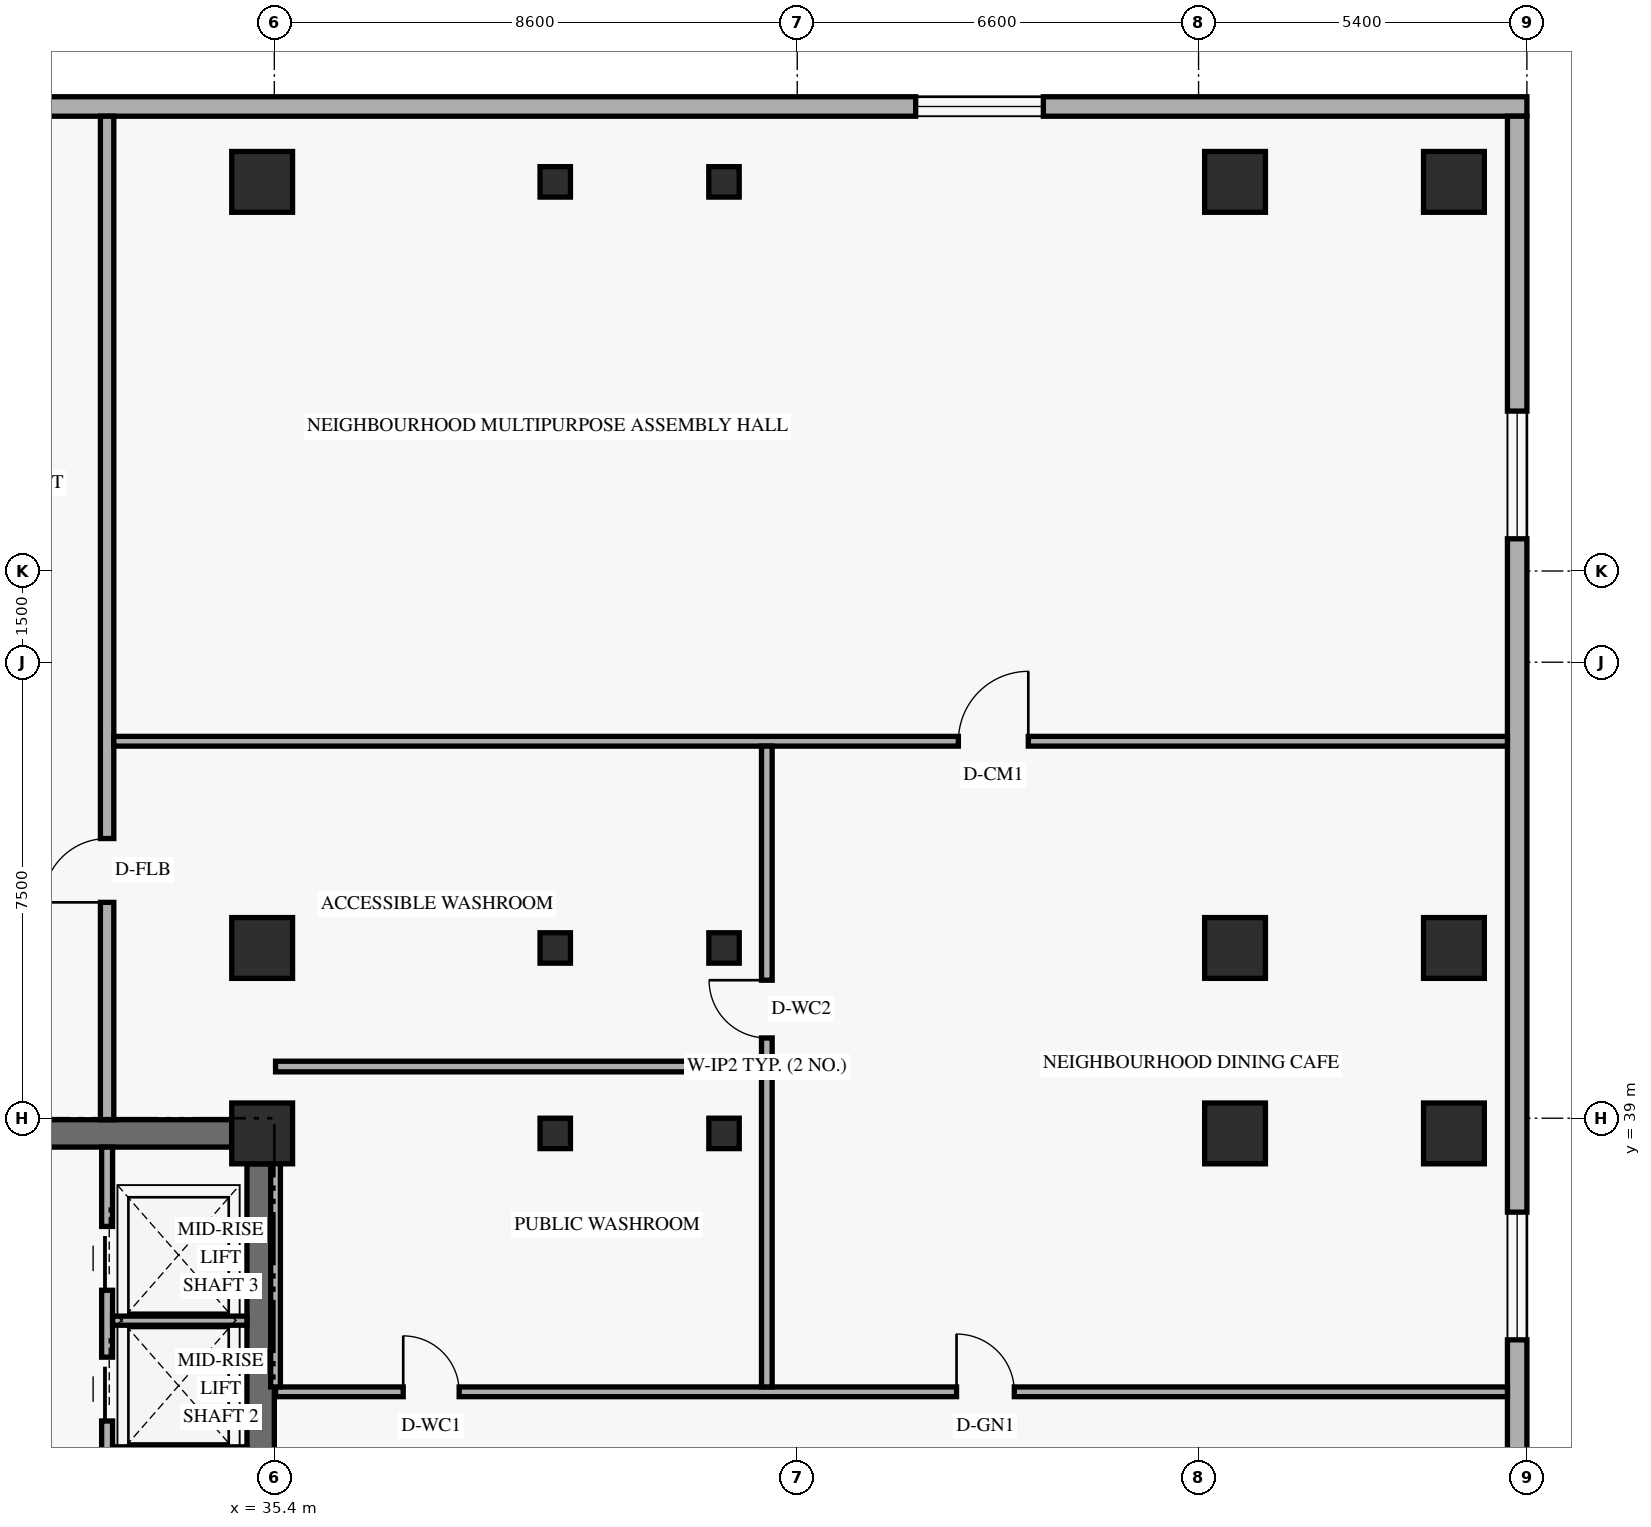
"""IFC4 building model, lengths in metres.
Left out: names, types, materials, properties, quantities, classifications, styles, units other than length and angle.
Written with IfcOpenShell. Run it as: python <this file> out.ifc"""

import sys

from ifc_helpers import new_model, si_unit, direction, frame, frame_2d, origin, origin_2d, place, context, subcontext, project, spatial, rectangle, hollow_rectangle, extrude, element, fill, save


model = new_model("IFC4")
c1 = context("Model", 3, precision=1e-05, world=origin(), true_north=direction((0.0, 1.0)))
c2 = subcontext(c1, "Body", "Model", "MODEL_VIEW")
j1 = project(units=[si_unit("LENGTHUNIT", "METRE"), si_unit("PLANEANGLEUNIT", "RADIAN")], contexts=[c1])
p1 = place(None, origin())
s1 = spatial("IfcSite", under=j1, at=p1, CompositionType="ELEMENT")
p2 = place(p1, origin())
s2 = spatial("IfcBuilding", under=s1, at=p2, CompositionType="ELEMENT")
p3 = place(p2, origin())
s3 = spatial("IfcBuildingStorey", under=s2, at=p3, CompositionType="ELEMENT", Elevation=0.0)
p4 = place(p3, frame((35.175, 31.35, 0.0), z_axis=(0.0, 0.0, 1.0), x_axis=(0.0, 1.0, 0.0)))
e1 = element("IfcWall", 1, at=p4, inside=s3, PredefinedType="SHEAR", context=c2, shape_type="SweptSolid", body=[
    extrude(rectangle(XDim=6.9, YDim=0.45, at=frame_2d((3.45, 0.0))), origin(), (0.0, 0.0, 1.0), 3.539),
])
p5 = place(p3, frame((24.7, 38.75, 0.0), z_axis=(0.0, 0.0, 1.0), x_axis=(1.0, 0.0, 0.0)))
e2 = element("IfcWall", 2, at=p5, inside=s3, PredefinedType="SHEAR", context=c2, shape_type="SweptSolid", body=[
    extrude(rectangle(XDim=10.0, YDim=0.45, at=frame_2d((5.0, 0.0))), origin(), (0.0, 0.0, 1.0), 4.39),
])
p6 = place(p5, frame((5.2, 0.0, 0.0)))
e3 = element("IfcOpeningElement", 3, at=p6, cuts=e2, PredefinedType="OPENING", context=c2, shape_type="SweptSolid", body=[
    extrude(rectangle(XDim=1.1, YDim=2.15, at=frame_2d((0.55, 1.075))), frame((0.0, 0.235, 0.0), z_axis=(0.0, -1.0, 0.0), x_axis=(1.0, 0.0, 0.0)), (0.0, 0.0, 1.0), 0.47),
])
for number, where, z_axis, x_axis in (
    (4, (35.2, 38.75, 0.0), (0.0, 0.0, 1.0), (1.0, 0.0, 0.0)),
    (5, (35.2, 41.8, 0.0), (0.0, 0.0, 1.0), (1.0, 0.0, 0.0)),
    (6, (35.2, 54.4, 0.0), (0.0, 0.0, 1.0), (1.0, 0.0, 0.0)),
):
    element("IfcColumn", number, at=place(p3, frame(where, z_axis=z_axis, x_axis=x_axis)), inside=s3, PredefinedType="COLUMN", context=c2, shape_type="SweptSolid", body=[
        extrude(rectangle(XDim=1.0, YDim=1.0, at=origin_2d()), origin(), (0.0, 0.0, 1.0), 4.8),
    ])
for number, where, z_axis, x_axis in (
    (7, (39.936, 38.75, 0.0), (0.035, 0.0, 0.999), (0.0, 1.0, 0.0)),
    (8, (39.936, 41.8, 0.0), (0.035, 0.0, 0.999), (0.0, 1.0, 0.0)),
    (9, (39.936, 54.4, 0.0), (0.035, 0.0, 0.999), (0.0, 1.0, 0.0)),
):
    element("IfcColumn", number, at=place(p3, frame(where, z_axis=z_axis, x_axis=x_axis)), inside=s3, PredefinedType="COLUMN", context=c2, shape_type="SweptSolid", body=[
        extrude(hollow_rectangle(XDim=0.5, YDim=0.5, WallThickness=0.022, at=origin_2d()), origin(), (0.0, 0.0, 1.0), 4.803),
    ])
for number, where, z_axis, x_axis in (
    (10, (42.657, 38.75, 0.0), (0.058, 0.0, 0.998), (0.0, 1.0, 0.0)),
    (11, (42.657, 41.8, 0.0), (0.058, 0.0, 0.998), (0.0, 1.0, 0.0)),
):
    element("IfcColumn", number, at=place(p3, frame(where, z_axis=z_axis, x_axis=x_axis)), inside=s3, PredefinedType="COLUMN", context=c2, shape_type="SweptSolid", body=[
        extrude(hollow_rectangle(XDim=0.5, YDim=0.5, WallThickness=0.022, at=origin_2d()), origin(), (0.0, 0.0, 1.0), 4.808),
    ])
p7 = place(p3, frame((42.657, 54.4, 0.0), z_axis=(0.057935044615, 0.0, 0.998320354699), x_axis=(0.0, 1.0, 0.0)))
e12 = element("IfcColumn", 12, at=p7, inside=s3, PredefinedType="COLUMN", context=c2, shape_type="SweptSolid", body=[
    extrude(hollow_rectangle(XDim=0.5, YDim=0.5, WallThickness=0.022, at=origin_2d()), origin(), (0.0, 0.0, 1.0), 4.783),
])
for number, where, z_axis, x_axis in (
    (13, (51.2, 38.75, 0.0), (0.0, 0.0, 1.0), (1.0, 0.0, 0.0)),
    (14, (51.2, 41.8, 0.0), (0.0, 0.0, 1.0), (1.0, 0.0, 0.0)),
    (15, (51.2, 54.4, 0.0), (0.0, 0.0, 1.0), (1.0, 0.0, 0.0)),
    (16, (54.8, 38.75, 0.0), (0.0, 0.0, 1.0), (1.0, 0.0, 0.0)),
    (17, (54.8, 41.8, 0.0), (0.0, 0.0, 1.0), (1.0, 0.0, 0.0)),
    (18, (54.8, 54.4, 0.0), (0.0, 0.0, 1.0), (1.0, 0.0, 0.0)),
):
    element("IfcColumn", number, at=place(p3, frame(where, z_axis=z_axis, x_axis=x_axis)), inside=s3, PredefinedType="COLUMN", context=c2, shape_type="SweptSolid", body=[
        extrude(rectangle(XDim=1.0, YDim=1.0, at=origin_2d()), origin(), (0.0, 0.0, 1.0), 4.8),
    ])
p8 = place(p3, frame((0.0, 55.64, 0.0), z_axis=(0.0, 0.0, 1.0), x_axis=(1.0, 0.0, 0.0)))
e19 = element("IfcWall", 19, at=p8, inside=s3, PredefinedType="SOLIDWALL", context=c2, shape_type="SweptSolid", body=[
    extrude(rectangle(XDim=56.0, YDim=0.32, at=frame_2d((28.0, 0.0))), origin(), (0.0, 0.0, 1.0), 4.39),
])
p9 = place(p8, frame((29.6, 0.0, 0.0)))
e20 = element("IfcOpeningElement", 20, at=p9, cuts=e19, PredefinedType="OPENING", context=c2, shape_type="SweptSolid", body=[
    extrude(rectangle(XDim=1.8, YDim=2.25, at=frame_2d((0.9, 1.125))), frame((0.0, 0.17, 0.0), z_axis=(0.0, -1.0, 0.0), x_axis=(1.0, 0.0, 0.0)), (0.0, 0.0, 1.0), 0.34),
])
p10 = place(p8, frame((15.2, 0.0, 0.0)))
e21 = element("IfcOpeningElement", 21, at=p10, cuts=e19, PredefinedType="OPENING", context=c2, shape_type="SweptSolid", body=[
    extrude(rectangle(XDim=2.0, YDim=2.35, at=frame_2d((1.0, 1.175))), frame((0.0, 0.17, 0.0), z_axis=(0.0, -1.0, 0.0), x_axis=(1.0, 0.0, 0.0)), (0.0, 0.0, 1.0), 0.34),
])
p11 = place(p8, frame((5.45, 0.0, 0.85)))
e22 = element("IfcOpeningElement", 22, at=p11, cuts=e19, PredefinedType="OPENING", context=c2, shape_type="SweptSolid", body=[
    extrude(rectangle(XDim=2.1, YDim=1.75, at=frame_2d((1.05, 0.875))), frame((0.0, 0.17, 0.0), z_axis=(0.0, -1.0, 0.0), x_axis=(1.0, 0.0, 0.0)), (0.0, 0.0, 1.0), 0.34),
])
p12 = place(p8, frame((20.175, 0.0, 0.85)))
e23 = element("IfcOpeningElement", 23, at=p12, cuts=e19, PredefinedType="OPENING", context=c2, shape_type="SweptSolid", body=[
    extrude(rectangle(XDim=2.1, YDim=1.75, at=frame_2d((1.05, 0.875))), frame((0.0, 0.17, 0.0), z_axis=(0.0, -1.0, 0.0), x_axis=(1.0, 0.0, 0.0)), (0.0, 0.0, 1.0), 0.34),
])
p13 = place(p8, frame((45.948, 0.0, 0.85)))
e24 = element("IfcOpeningElement", 24, at=p13, cuts=e19, PredefinedType="OPENING", context=c2, shape_type="SweptSolid", body=[
    extrude(rectangle(XDim=2.1, YDim=1.75, at=frame_2d((1.05, 0.875))), frame((0.0, 0.17, 0.0), z_axis=(0.0, -1.0, 0.0), x_axis=(1.0, 0.0, 0.0)), (0.0, 0.0, 1.0), 0.34),
])
p14 = place(p3, frame((55.84, 28.5, 0.0), z_axis=(0.0, 0.0, 1.0), x_axis=(0.0, 1.0, 0.0)))
e25 = element("IfcWall", 25, at=p14, inside=s3, PredefinedType="SOLIDWALL", context=c2, shape_type="SweptSolid", body=[
    extrude(rectangle(XDim=26.98, YDim=0.32, at=frame_2d((13.49, 0.0))), origin(), (0.0, 0.0, 1.0), 4.39),
])
p15 = place(p14, frame((2.2, 0.0, 0.0)))
e26 = element("IfcOpeningElement", 26, at=p15, cuts=e25, PredefinedType="OPENING", context=c2, shape_type="SweptSolid", body=[
    extrude(rectangle(XDim=2.0, YDim=2.35, at=frame_2d((1.0, 1.175))), frame((0.0, 0.17, 0.0), z_axis=(0.0, -1.0, 0.0), x_axis=(1.0, 0.0, 0.0)), (0.0, 0.0, 1.0), 0.34),
])
p16 = place(p14, frame((6.855, 0.0, 0.85)))
e27 = element("IfcOpeningElement", 27, at=p16, cuts=e25, PredefinedType="OPENING", context=c2, shape_type="SweptSolid", body=[
    extrude(rectangle(XDim=2.1, YDim=1.75, at=frame_2d((1.05, 0.875))), frame((0.0, 0.17, 0.0), z_axis=(0.0, -1.0, 0.0), x_axis=(1.0, 0.0, 0.0)), (0.0, 0.0, 1.0), 0.34),
])
p17 = place(p14, frame((20.03, 0.0, 0.85)))
e28 = element("IfcOpeningElement", 28, at=p17, cuts=e25, PredefinedType="OPENING", context=c2, shape_type="SweptSolid", body=[
    extrude(rectangle(XDim=2.1, YDim=1.75, at=frame_2d((1.05, 0.875))), frame((0.0, 0.17, 0.0), z_axis=(0.0, -1.0, 0.0), x_axis=(1.0, 0.0, 0.0)), (0.0, 0.0, 1.0), 0.34),
])
p18 = place(p3, frame((32.65, 31.35, 0.0), z_axis=(0.0, 0.0, 1.0), x_axis=(0.0, 1.0, 0.0)))
e29 = element("IfcWall", 29, at=p18, inside=s3, PredefinedType="STANDARD", context=c2, shape_type="SweptSolid", body=[
    extrude(rectangle(XDim=7.175, YDim=0.18, at=frame_2d((3.587, 0.0))), origin(), (0.0, 0.0, 1.0), 4.39),
])
p19 = place(p18, frame((0.52, 0.0, 0.0)))
e30 = element("IfcOpeningElement", 30, at=p19, cuts=e29, PredefinedType="OPENING", context=c2, shape_type="SweptSolid", body=[
    extrude(rectangle(XDim=1.05, YDim=2.2, at=frame_2d((0.525, 1.1))), frame((0.0, 0.1, 0.0), z_axis=(0.0, -1.0, 0.0), x_axis=(1.0, 0.0, 0.0)), (0.0, 0.0, 1.0), 0.2),
])
p20 = place(p18, frame((2.67, 0.0, 0.0)))
e31 = element("IfcOpeningElement", 31, at=p20, cuts=e29, PredefinedType="OPENING", context=c2, shape_type="SweptSolid", body=[
    extrude(rectangle(XDim=1.05, YDim=2.2, at=frame_2d((0.525, 1.1))), frame((0.0, 0.1, 0.0), z_axis=(0.0, -1.0, 0.0), x_axis=(1.0, 0.0, 0.0)), (0.0, 0.0, 1.0), 0.2),
])
p21 = place(p18, frame((4.82, 0.0, 0.0)))
e32 = element("IfcOpeningElement", 32, at=p21, cuts=e29, PredefinedType="OPENING", context=c2, shape_type="SweptSolid", body=[
    extrude(rectangle(XDim=1.05, YDim=2.2, at=frame_2d((0.525, 1.1))), frame((0.0, 0.1, 0.0), z_axis=(0.0, -1.0, 0.0), x_axis=(1.0, 0.0, 0.0)), (0.0, 0.0, 1.0), 0.2),
])
p22 = place(p3, frame((32.74, 35.67, 0.0), z_axis=(0.0, 0.0, 1.0), x_axis=(1.0, 0.0, 0.0)))
e33 = element("IfcWall", 33, at=p22, inside=s3, PredefinedType="STANDARD", context=c2, shape_type="SweptSolid", body=[
    extrude(rectangle(XDim=2.21, YDim=0.15, at=frame_2d((1.105, 0.0))), origin(), (0.0, 0.0, 1.0), 4.39),
])
p23 = place(p3, frame((32.65, 38.975, 0.0), z_axis=(0.0, 0.0, 1.0), x_axis=(0.0, 1.0, 0.0)))
e34 = element("IfcWall", 34, at=p23, inside=s3, PredefinedType="STANDARD", context=c2, shape_type="SweptSolid", body=[
    extrude(rectangle(XDim=16.505, YDim=0.22, at=frame_2d((8.252, 0.0))), origin(), (0.0, 0.0, 1.0), 3.272),
])
p24 = place(p23, frame((3.575, 0.0, 0.0)))
e35 = element("IfcOpeningElement", 35, at=p24, cuts=e34, PredefinedType="OPENING", context=c2, shape_type="SweptSolid", body=[
    extrude(rectangle(XDim=1.05, YDim=2.15, at=frame_2d((0.525, 1.075))), frame((0.0, 0.12, 0.0), z_axis=(0.0, -1.0, 0.0), x_axis=(1.0, 0.0, 0.0)), (0.0, 0.0, 1.0), 0.24),
])
p25 = place(p3, frame((35.42, 34.5, 0.0), z_axis=(0.0, 0.0, 1.0), x_axis=(1.0, 0.0, 0.0)))
e36 = element("IfcWall", 36, at=p25, inside=s3, PredefinedType="PARTITIONING", context=c2, shape_type="SweptSolid", body=[
    extrude(rectangle(XDim=20.26, YDim=0.16, at=frame_2d((10.13, 0.0))), origin(), (0.0, 0.0, 1.0), 3.521),
])
p26 = place(p25, frame((2.1, 0.0, 0.0)))
e37 = element("IfcOpeningElement", 37, at=p26, cuts=e36, PredefinedType="OPENING", context=c2, shape_type="SweptSolid", body=[
    extrude(rectangle(XDim=0.92, YDim=2.14, at=frame_2d((0.46, 1.07))), frame((0.0, 0.09, 0.0), z_axis=(0.0, -1.0, 0.0), x_axis=(1.0, 0.0, 0.0)), (0.0, 0.0, 1.0), 0.18),
])
p27 = place(p25, frame((11.2, 0.0, 0.0)))
e38 = element("IfcOpeningElement", 38, at=p27, cuts=e36, PredefinedType="OPENING", context=c2, shape_type="SweptSolid", body=[
    extrude(rectangle(XDim=0.95, YDim=2.15, at=frame_2d((0.475, 1.075))), frame((0.0, 0.09, 0.0), z_axis=(0.0, -1.0, 0.0), x_axis=(1.0, 0.0, 0.0)), (0.0, 0.0, 1.0), 0.18),
])
p28 = place(p3, frame((35.42, 34.58, 0.0), z_axis=(0.0, 0.0, 1.0), x_axis=(0.0, 1.0, 0.0)))
e39 = element("IfcWall", 39, at=p28, inside=s3, PredefinedType="PARTITIONING", context=c2, shape_type="SweptSolid", body=[
    extrude(rectangle(XDim=4.17, YDim=0.16, at=frame_2d((2.085, 0.0))), origin(), (0.0, 0.0, 1.0), 3.521),
])
p29 = place(p3, frame((32.76, 45.2, 0.0), z_axis=(0.0, 0.0, 1.0), x_axis=(1.0, 0.0, 0.0)))
e40 = element("IfcWall", 40, at=p29, inside=s3, PredefinedType="PARTITIONING", context=c2, shape_type="SweptSolid", body=[
    extrude(rectangle(XDim=22.92, YDim=0.16, at=frame_2d((11.46, 0.0))), origin(), (0.0, 0.0, 1.0), 3.521),
])
p30 = place(p29, frame((13.89, 0.0, 0.0)))
e41 = element("IfcOpeningElement", 41, at=p30, cuts=e40, PredefinedType="OPENING", context=c2, shape_type="SweptSolid", body=[
    extrude(rectangle(XDim=1.15, YDim=2.15, at=frame_2d((0.575, 1.075))), frame((0.0, 0.09, 0.0), z_axis=(0.0, -1.0, 0.0), x_axis=(1.0, 0.0, 0.0)), (0.0, 0.0, 1.0), 0.18),
])
p31 = place(p3, frame((43.5, 34.58, 0.0), z_axis=(0.0, 0.0, 1.0), x_axis=(0.0, 1.0, 0.0)))
e42 = element("IfcWall", 42, at=p31, inside=s3, PredefinedType="PLUMBINGWALL", context=c2, shape_type="SweptSolid", body=[
    extrude(rectangle(XDim=10.54, YDim=0.175, at=frame_2d((5.27, 0.0))), origin(), (0.0, 0.0, 1.0), 3.272),
])
p32 = place(p31, frame((5.74, 0.0, 0.0)))
e43 = element("IfcOpeningElement", 43, at=p32, cuts=e42, PredefinedType="OPENING", context=c2, shape_type="SweptSolid", body=[
    extrude(rectangle(XDim=0.95, YDim=2.14, at=frame_2d((0.475, 1.07))), frame((0.0, 0.097, 0.0), z_axis=(0.0, -1.0, 0.0), x_axis=(1.0, 0.0, 0.0)), (0.0, 0.0, 1.0), 0.195),
])
p33 = place(p3, frame((35.42, 39.85, 0.0), z_axis=(0.0, 0.0, 1.0), x_axis=(1.0, 0.0, 0.0)))
e44 = element("IfcWall", 44, at=p33, inside=s3, PredefinedType="PLUMBINGWALL", context=c2, shape_type="SweptSolid", body=[
    extrude(rectangle(XDim=7.993, YDim=0.175, at=frame_2d((3.996, 0.0))), origin(), (0.0, 0.0, 1.0), 3.521),
])
p34 = place(p13, origin())
e45 = element("IfcWindow", 45, at=p34, inside=s3, PartitioningType="SINGLE_PANEL", PredefinedType="WINDOW", context=c2, shape_type="SweptSolid", body=[
    extrude(rectangle(XDim=2.1, YDim=1.75, at=frame_2d((1.05, 0.875))), frame((0.0, 0.03, 0.0), z_axis=(0.0, -1.0, 0.0), x_axis=(1.0, 0.0, 0.0)), (0.0, 0.0, 1.0), 0.06),
])
fill(e24, e45)
p35 = place(p16, origin())
e46 = element("IfcWindow", 46, at=p35, inside=s3, PartitioningType="SINGLE_PANEL", PredefinedType="WINDOW", context=c2, shape_type="SweptSolid", body=[
    extrude(rectangle(XDim=2.1, YDim=1.75, at=frame_2d((1.05, 0.875))), frame((0.0, 0.03, 0.0), z_axis=(0.0, -1.0, 0.0), x_axis=(1.0, 0.0, 0.0)), (0.0, 0.0, 1.0), 0.06),
])
fill(e27, e46)
p36 = place(p17, origin())
e47 = element("IfcWindow", 47, at=p36, inside=s3, PartitioningType="SINGLE_PANEL", PredefinedType="WINDOW", context=c2, shape_type="SweptSolid", body=[
    extrude(rectangle(XDim=2.1, YDim=1.75, at=frame_2d((1.05, 0.875))), frame((0.0, 0.03, 0.0), z_axis=(0.0, -1.0, 0.0), x_axis=(1.0, 0.0, 0.0)), (0.0, 0.0, 1.0), 0.06),
])
fill(e28, e47)
p37 = place(p20, origin())
e48 = element("IfcDoor", 48, at=p37, inside=s3, OperationType="SLIDING_TO_LEFT", PredefinedType="DOOR", context=c2, shape_type="SweptSolid", body=[
    extrude(rectangle(XDim=1.05, YDim=2.2, at=frame_2d((0.525, 1.1))), frame((0.0, 0.025, 0.0), z_axis=(0.0, -1.0, 0.0), x_axis=(1.0, 0.0, 0.0)), (0.0, 0.0, 1.0), 0.05),
])
fill(e31, e48)
p38 = place(p21, origin())
e49 = element("IfcDoor", 49, at=p38, inside=s3, OperationType="SLIDING_TO_LEFT", PredefinedType="DOOR", context=c2, shape_type="SweptSolid", body=[
    extrude(rectangle(XDim=1.05, YDim=2.2, at=frame_2d((0.525, 1.1))), frame((0.0, 0.025, 0.0), z_axis=(0.0, -1.0, 0.0), x_axis=(1.0, 0.0, 0.0)), (0.0, 0.0, 1.0), 0.05),
])
fill(e32, e49)
p39 = place(p24, origin())
e50 = element("IfcDoor", 50, at=p39, inside=s3, OperationType="SINGLE_SWING_LEFT", PredefinedType="DOOR", context=c2, shape_type="SweptSolid", body=[
    extrude(rectangle(XDim=1.05, YDim=2.15, at=frame_2d((0.525, 1.075))), frame((0.0, 0.025, 0.0), z_axis=(0.0, -1.0, 0.0), x_axis=(1.0, 0.0, 0.0)), (0.0, 0.0, 1.0), 0.05),
])
fill(e35, e50)
p40 = place(p26, origin())
e51 = element("IfcDoor", 51, at=p40, inside=s3, OperationType="SINGLE_SWING_LEFT", PredefinedType="DOOR", context=c2, shape_type="SweptSolid", body=[
    extrude(rectangle(XDim=0.92, YDim=2.14, at=frame_2d((0.46, 1.07))), frame((0.0, 0.025, 0.0), z_axis=(0.0, -1.0, 0.0), x_axis=(1.0, 0.0, 0.0)), (0.0, 0.0, 1.0), 0.05),
])
fill(e37, e51)
p41 = place(p32, origin())
e52 = element("IfcDoor", 52, at=p41, inside=s3, OperationType="SINGLE_SWING_RIGHT", PredefinedType="DOOR", context=c2, shape_type="SweptSolid", body=[
    extrude(rectangle(XDim=0.95, YDim=2.14, at=frame_2d((0.475, 1.07))), frame((0.0, 0.025, 0.0), z_axis=(0.0, -1.0, 0.0), x_axis=(1.0, 0.0, 0.0)), (0.0, 0.0, 1.0), 0.05),
])
fill(e43, e52)
p42 = place(p27, origin())
e53 = element("IfcDoor", 53, at=p42, inside=s3, OperationType="SINGLE_SWING_LEFT", PredefinedType="DOOR", context=c2, shape_type="SweptSolid", body=[
    extrude(rectangle(XDim=0.95, YDim=2.15, at=frame_2d((0.475, 1.075))), frame((0.0, 0.025, 0.0), z_axis=(0.0, -1.0, 0.0), x_axis=(1.0, 0.0, 0.0)), (0.0, 0.0, 1.0), 0.05),
])
fill(e38, e53)
p43 = place(p30, origin())
e54 = element("IfcDoor", 54, at=p43, inside=s3, OperationType="SINGLE_SWING_RIGHT", PredefinedType="DOOR", context=c2, shape_type="SweptSolid", body=[
    extrude(rectangle(XDim=1.15, YDim=2.15, at=frame_2d((0.575, 1.075))), frame((0.0, 0.025, 0.0), z_axis=(0.0, -1.0, 0.0), x_axis=(1.0, 0.0, 0.0)), (0.0, 0.0, 1.0), 0.05),
])
fill(e41, e54)
save(model, sys.argv[1])
